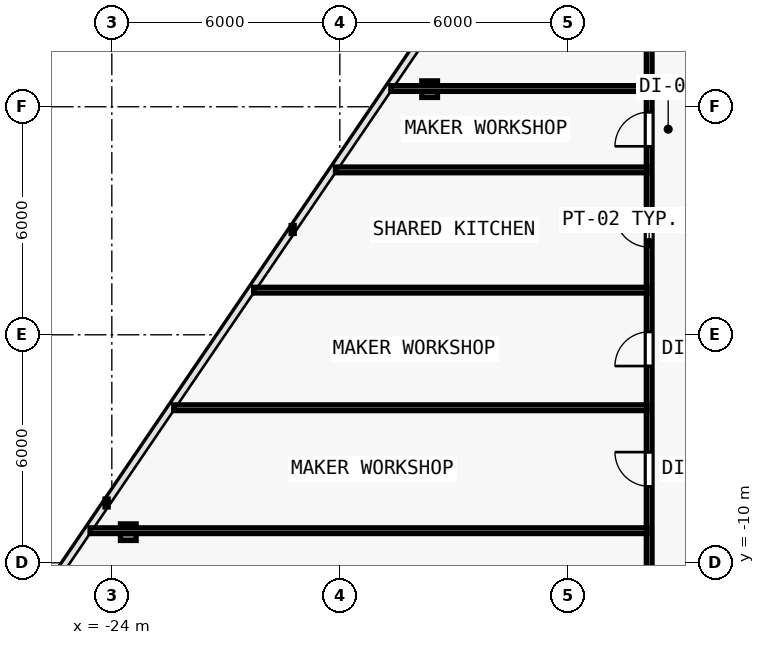
"""IFC4 building model, lengths in metres.
Left out: names, types, materials, properties, quantities, classifications, styles, units other than length and angle.
Written with IfcOpenShell. Run it as: python <this file> out.ifc"""

import sys

from ifc_helpers import new_model, si_unit, direction, frame, frame_2d, origin, origin_2d, place, context, subcontext, project, spatial, rectangle, i_section, extrude, element, fill, save


model = new_model("IFC4")
c1 = context("Model", 3, precision=1e-05, world=origin(), true_north=direction((0.0, 1.0)))
c2 = subcontext(c1, "Body", "Model", "MODEL_VIEW")
j1 = project(units=[si_unit("LENGTHUNIT", "METRE"), si_unit("PLANEANGLEUNIT", "RADIAN")], contexts=[c1])
p1 = place(None, origin())
s1 = spatial("IfcSite", under=j1, at=p1, CompositionType="ELEMENT")
p2 = place(p1, origin())
s2 = spatial("IfcBuilding", under=s1, at=p2, CompositionType="ELEMENT")
p3 = place(p2, frame((0.0, 0.0, 58.8)))
s3 = spatial("IfcBuildingStorey", under=s2, at=p3, CompositionType="ELEMENT", Elevation=58.8)
p4 = place(p3, frame((-15.637, 2.463, 0.005), z_axis=(0.017070406608, 0.009521342331, 0.99980895438), x_axis=(-0.487119351792, 0.873335409284, 0.0)))
e1 = element("IfcColumn", 1, at=p4, inside=s3, PredefinedType="COLUMN", context=c2, shape_type="SweptSolid", body=[
    extrude(i_section(OverallWidth=0.412, OverallDepth=0.435, WebThickness=0.023, FlangeThickness=0.037, FilletRadius=0.015, at=origin_2d()), origin(), (0.0, 0.0, 1.0), 3.59),
])
p5 = place(p3, frame((-23.566, -9.194, 0.005), z_axis=(0.025222449659, 0.021619242565, 0.999448065876), x_axis=(-0.650791373456, 0.759256602365, 0.0)))
e2 = element("IfcColumn", 2, at=p5, inside=s3, PredefinedType="COLUMN", context=c2, shape_type="SweptSolid", body=[
    extrude(i_section(OverallWidth=0.412, OverallDepth=0.435, WebThickness=0.023, FlangeThickness=0.037, FilletRadius=0.015, at=origin_2d()), origin(), (0.0, 0.0, 1.0), 3.591),
])
p6 = place(p3, frame((-9.86, -11.56, 0.0), z_axis=(0.0, 0.0, 1.0), x_axis=(0.0, 1.0, 0.0)))
e3 = element("IfcWall", 3, at=p6, inside=s3, PredefinedType="PARTITIONING", context=c2, shape_type="SweptSolid", body=[
    extrude(rectangle(XDim=19.986, YDim=0.15, at=frame_2d((9.993, 0.0))), origin(), (0.0, 0.0, 1.0), 2.609),
])
p7 = place(p6, frame((9.867, 0.0, 0.0)))
e4 = element("IfcOpeningElement", 4, at=p7, cuts=e3, PredefinedType="OPENING", context=c2, shape_type="SweptSolid", body=[
    extrude(rectangle(XDim=0.9, YDim=2.1, at=frame_2d((0.45, 1.05))), frame((0.0, 0.085, 0.0), z_axis=(0.0, -1.0, 0.0), x_axis=(1.0, 0.0, 0.0)), (0.0, 0.0, 1.0), 0.17),
])
p8 = place(p6, frame((6.738, 0.0, 0.0)))
e5 = element("IfcOpeningElement", 5, at=p8, cuts=e3, PredefinedType="OPENING", context=c2, shape_type="SweptSolid", body=[
    extrude(rectangle(XDim=0.9, YDim=2.1, at=frame_2d((0.45, 1.05))), frame((0.0, 0.085, 0.0), z_axis=(0.0, -1.0, 0.0), x_axis=(1.0, 0.0, 0.0)), (0.0, 0.0, 1.0), 0.17),
])
p9 = place(p6, frame((3.573, 0.0, 0.0)))
e6 = element("IfcOpeningElement", 6, at=p9, cuts=e3, PredefinedType="OPENING", context=c2, shape_type="SweptSolid", body=[
    extrude(rectangle(XDim=0.9, YDim=2.1, at=frame_2d((0.45, 1.05))), frame((0.0, 0.085, 0.0), z_axis=(0.0, -1.0, 0.0), x_axis=(1.0, 0.0, 0.0)), (0.0, 0.0, 1.0), 0.17),
])
p10 = place(p6, frame((16.474, 0.0, 0.0)))
e7 = element("IfcOpeningElement", 7, at=p10, cuts=e3, PredefinedType="OPENING", context=c2, shape_type="SweptSolid", body=[
    extrude(rectangle(XDim=0.9, YDim=2.1, at=frame_2d((0.45, 1.05))), frame((0.0, 0.085, 0.0), z_axis=(0.0, -1.0, 0.0), x_axis=(1.0, 0.0, 0.0)), (0.0, 0.0, 1.0), 0.17),
])
p11 = place(p6, frame((12.52, 0.0, 0.0)))
e8 = element("IfcOpeningElement", 8, at=p11, cuts=e3, PredefinedType="OPENING", context=c2, shape_type="SweptSolid", body=[
    extrude(rectangle(XDim=0.9, YDim=2.1, at=frame_2d((0.45, 1.05))), frame((0.0, 0.085, 0.0), z_axis=(0.0, -1.0, 0.0), x_axis=(1.0, 0.0, 0.0)), (0.0, 0.0, 1.0), 0.17),
])
p12 = place(p3, frame((-9.92, 2.48, 0.0), z_axis=(0.0, 0.0, 1.0), x_axis=(-1.0, 0.0, 0.0)))
e9 = element("IfcWall", 9, at=p12, inside=s3, PredefinedType="PARTITIONING", context=c2, shape_type="SweptSolid", body=[
    extrude(rectangle(XDim=6.738, YDim=0.15, at=frame_2d((3.369, 0.0))), origin(), (0.0, 0.0, 1.0), 2.735),
])
p13 = place(p3, frame((-9.92, -9.155, 0.0), z_axis=(0.0, 0.0, 1.0), x_axis=(-1.0, 0.0, 0.0)))
e10 = element("IfcWall", 10, at=p13, inside=s3, PredefinedType="PARTITIONING", context=c2, shape_type="SweptSolid", body=[
    extrude(rectangle(XDim=14.653, YDim=0.15, at=frame_2d((7.326, 0.0))), origin(), (0.0, 0.0, 1.0), 2.609),
])
p14 = place(p3, frame((-9.92, -2.826, 0.0), z_axis=(0.0, 0.0, 1.0), x_axis=(-1.0, 0.0, 0.0)))
e11 = element("IfcWall", 11, at=p14, inside=s3, PredefinedType="PARTITIONING", context=c2, shape_type="SweptSolid", body=[
    extrude(rectangle(XDim=10.347, YDim=0.15, at=frame_2d((5.174, 0.0))), origin(), (0.0, 0.0, 1.0), 2.735),
])
p15 = place(p3, frame((-9.92, 0.339, 0.0), z_axis=(0.0, 0.0, 1.0), x_axis=(-1.0, 0.0, 0.0)))
e12 = element("IfcWall", 12, at=p15, inside=s3, PredefinedType="PARTITIONING", context=c2, shape_type="SweptSolid", body=[
    extrude(rectangle(XDim=8.194, YDim=0.15, at=frame_2d((4.097, 0.0))), origin(), (0.0, 0.0, 1.0), 2.735),
])
p16 = place(p3, frame((-9.92, -5.919, 0.0), z_axis=(0.0, 0.0, 1.0), x_axis=(-1.0, 0.0, 0.0)))
e13 = element("IfcWall", 13, at=p16, inside=s3, PredefinedType="PARTITIONING", context=c2, shape_type="SweptSolid", body=[
    extrude(rectangle(XDim=12.452, YDim=0.15, at=frame_2d((6.226, 0.0))), origin(), (0.0, 0.0, 1.0), 2.735),
])
p17 = place(p7, origin())
e14 = element("IfcDoor", 14, at=p17, inside=s3, OperationType="SINGLE_SWING_RIGHT", PredefinedType="DOOR", context=c2, shape_type="SweptSolid", body=[
    extrude(rectangle(XDim=0.9, YDim=2.1, at=frame_2d((0.45, 1.05))), frame((0.0, 0.025, 0.0), z_axis=(0.0, -1.0, 0.0), x_axis=(1.0, 0.0, 0.0)), (0.0, 0.0, 1.0), 0.05),
])
fill(e4, e14)
p18 = place(p8, origin())
e15 = element("IfcDoor", 15, at=p18, inside=s3, OperationType="SINGLE_SWING_LEFT", PredefinedType="DOOR", context=c2, shape_type="SweptSolid", body=[
    extrude(rectangle(XDim=0.9, YDim=2.1, at=frame_2d((0.45, 1.05))), frame((0.0, 0.025, 0.0), z_axis=(0.0, -1.0, 0.0), x_axis=(1.0, 0.0, 0.0)), (0.0, 0.0, 1.0), 0.05),
])
fill(e5, e15)
p19 = place(p9, origin())
e16 = element("IfcDoor", 16, at=p19, inside=s3, OperationType="SINGLE_SWING_RIGHT", PredefinedType="DOOR", context=c2, shape_type="SweptSolid", body=[
    extrude(rectangle(XDim=0.9, YDim=2.1, at=frame_2d((0.45, 1.05))), frame((0.0, 0.025, 0.0), z_axis=(0.0, -1.0, 0.0), x_axis=(1.0, 0.0, 0.0)), (0.0, 0.0, 1.0), 0.05),
])
fill(e6, e16)
p20 = place(p11, origin())
e17 = element("IfcDoor", 17, at=p20, inside=s3, OperationType="SINGLE_SWING_LEFT", PredefinedType="DOOR", context=c2, shape_type="SweptSolid", body=[
    extrude(rectangle(XDim=0.9, YDim=2.1, at=frame_2d((0.45, 1.05))), frame((0.0, 0.025, 0.0), z_axis=(0.0, -1.0, 0.0), x_axis=(1.0, 0.0, 0.0)), (0.0, 0.0, 1.0), 0.05),
])
fill(e8, e17)
save(model, sys.argv[1])
